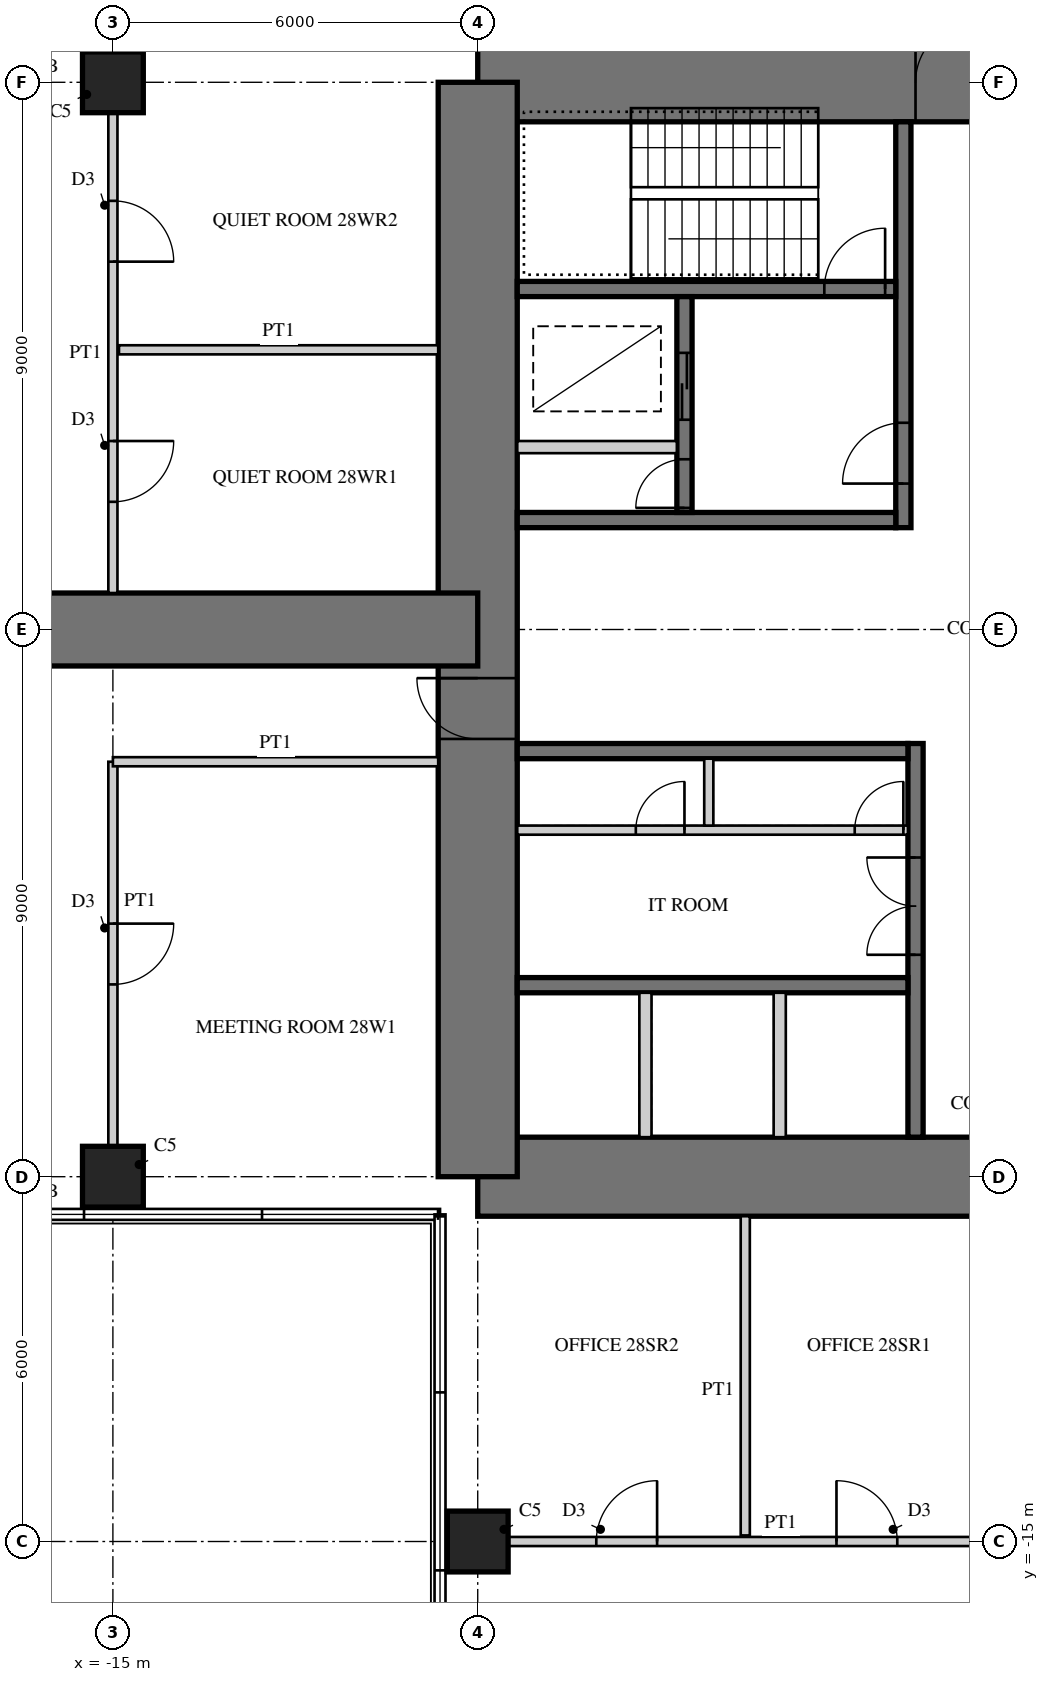
"""IFC4 building model, lengths in metres.
Left out: names, types, materials, properties, quantities, classifications, styles, units other than length and angle.
Written with IfcOpenShell. Run it as: python <this file> out.ifc"""

import sys

from ifc_helpers import new_model, si_unit, direction, frame, frame_2d, origin, origin_2d, place, context, subcontext, project, spatial, rectangle, extrude, element, fill, save


model = new_model("IFC4")
c1 = context("Model", 3, precision=1e-05, world=origin(), true_north=direction((0.0, 1.0)))
c2 = subcontext(c1, "Body", "Model", "MODEL_VIEW")
j1 = project(units=[si_unit("LENGTHUNIT", "METRE"), si_unit("PLANEANGLEUNIT", "RADIAN")], contexts=[c1])
p1 = place(None, origin())
s1 = spatial("IfcSite", under=j1, at=p1, CompositionType="ELEMENT")
p2 = place(p1, origin())
s2 = spatial("IfcBuilding", under=s1, at=p2, CompositionType="ELEMENT")
p3 = place(p2, frame((0.0, 0.0, 116.5)))
s3 = spatial("IfcBuildingStorey", under=s2, at=p3, CompositionType="ELEMENT", Elevation=116.5)
p4 = place(p3, frame((9.0, 9.0, 0.0), z_axis=(0.0, 0.0, 1.0), x_axis=(-1.0, 0.0, 0.0)))
e1 = element("IfcWall", 1, at=p4, inside=s3, PredefinedType="SHEAR", context=c2, shape_type="SweptSolid", body=[
    extrude(rectangle(XDim=18.0, YDim=1.3, at=frame_2d((9.0, 0.0))), origin(), (0.0, 0.0, 1.0), 4.0),
])
p5 = place(p4, frame((9.8, 0.0, 0.0)))
e2 = element("IfcOpeningElement", 2, at=p5, cuts=e1, PredefinedType="OPENING", context=c2, shape_type="SweptSolid", body=[
    extrude(rectangle(XDim=1.0, YDim=2.4, at=frame_2d((0.5, 1.2))), frame((0.0, 0.66, 0.0), z_axis=(0.0, -1.0, 0.0), x_axis=(1.0, 0.0, 0.0)), (0.0, 0.0, 1.0), 1.32),
])
p6 = place(p3, frame((-9.0, -9.0, 0.0), z_axis=(0.0, 0.0, 1.0), x_axis=(1.0, 0.0, 0.0)))
e3 = element("IfcWall", 3, at=p6, inside=s3, PredefinedType="SHEAR", context=c2, shape_type="SweptSolid", body=[
    extrude(rectangle(XDim=18.0, YDim=1.3, at=frame_2d((9.0, 0.0))), origin(), (0.0, 0.0, 1.0), 4.0),
])
p7 = place(p6, frame((9.8, 0.0, 0.0)))
e4 = element("IfcOpeningElement", 4, at=p7, cuts=e3, PredefinedType="OPENING", context=c2, shape_type="SweptSolid", body=[
    extrude(rectangle(XDim=1.0, YDim=2.4, at=frame_2d((0.5, 1.2))), frame((0.0, 0.66, 0.0), z_axis=(0.0, -1.0, 0.0), x_axis=(1.0, 0.0, 0.0)), (0.0, 0.0, 1.0), 1.32),
])
p8 = place(p3, frame((-9.0, 9.0, 0.0), z_axis=(0.0, 0.0, 1.0), x_axis=(0.0, -1.0, 0.0)))
e5 = element("IfcWall", 5, at=p8, inside=s3, PredefinedType="SHEAR", context=c2, shape_type="SweptSolid", body=[
    extrude(rectangle(XDim=18.0, YDim=1.3, at=frame_2d((9.0, 0.0))), origin(), (0.0, 0.0, 1.0), 4.0),
])
p9 = place(p8, frame((9.8, 0.0, 0.0)))
e6 = element("IfcOpeningElement", 6, at=p9, cuts=e5, PredefinedType="OPENING", context=c2, shape_type="SweptSolid", body=[
    extrude(rectangle(XDim=1.0, YDim=2.4, at=frame_2d((0.5, 1.2))), frame((0.0, 0.66, 0.0), z_axis=(0.0, -1.0, 0.0), x_axis=(1.0, 0.0, 0.0)), (0.0, 0.0, 1.0), 1.32),
])
p10 = place(p3, frame((-2.0, 1.675, 0.0), z_axis=(0.0, 0.0, 1.0), x_axis=(0.0, 1.0, 0.0)))
e7 = element("IfcWall", 7, at=p10, inside=s3, PredefinedType="SHEAR", context=c2, shape_type="SweptSolid", body=[
    extrude(rectangle(XDim=6.675, YDim=0.25, at=frame_2d((3.337, 0.0))), origin(), (0.0, 0.0, 1.0), 4.0),
])
p11 = place(p10, frame((0.725, 0.0, 0.0)))
e8 = element("IfcOpeningElement", 8, at=p11, cuts=e7, PredefinedType="OPENING", context=c2, shape_type="SweptSolid", body=[
    extrude(rectangle(XDim=1.0, YDim=2.1, at=frame_2d((0.5, 1.05))), frame((0.0, 0.135, 0.0), z_axis=(0.0, -1.0, 0.0), x_axis=(1.0, 0.0, 0.0)), (0.0, 0.0, 1.0), 0.27),
])
p12 = place(p3, frame((-2.125, 1.8, 0.0), z_axis=(0.0, 0.0, 1.0), x_axis=(-1.0, 0.0, 0.0)))
e9 = element("IfcWall", 9, at=p12, inside=s3, PredefinedType="SHEAR", context=c2, shape_type="SweptSolid", body=[
    extrude(rectangle(XDim=6.225, YDim=0.25, at=frame_2d((3.113, 0.0))), origin(), (0.0, 0.0, 1.0), 4.0),
])
p13 = place(p3, frame((-2.125, 5.6, 0.0), z_axis=(0.0, 0.0, 1.0), x_axis=(-1.0, 0.0, 0.0)))
e10 = element("IfcWall", 10, at=p13, inside=s3, PredefinedType="SHEAR", context=c2, shape_type="SweptSolid", body=[
    extrude(rectangle(XDim=6.225, YDim=0.25, at=frame_2d((3.113, 0.0))), origin(), (0.0, 0.0, 1.0), 4.0),
])
p14 = place(p13, frame((0.175, 0.0, 0.0)))
e11 = element("IfcOpeningElement", 11, at=p14, cuts=e10, PredefinedType="OPENING", context=c2, shape_type="SweptSolid", body=[
    extrude(rectangle(XDim=1.0, YDim=2.1, at=frame_2d((0.5, 1.05))), frame((0.0, 0.135, 0.0), z_axis=(0.0, -1.0, 0.0), x_axis=(1.0, 0.0, 0.0)), (0.0, 0.0, 1.0), 0.27),
])
p15 = place(p3, frame((-5.6, 1.925, 0.0), z_axis=(0.0, 0.0, 1.0), x_axis=(0.0, 1.0, 0.0)))
e12 = element("IfcWall", 12, at=p15, inside=s3, PredefinedType="SHEAR", context=c2, shape_type="SweptSolid", body=[
    extrude(rectangle(XDim=3.55, YDim=0.25, at=frame_2d((1.775, 0.0))), origin(), (0.0, 0.0, 1.0), 4.0),
])
p16 = place(p15, frame((1.525, 0.0, 0.0)))
e13 = element("IfcOpeningElement", 13, at=p16, cuts=e12, PredefinedType="OPENING", context=c2, shape_type="SweptSolid", body=[
    extrude(rectangle(XDim=1.1, YDim=2.2, at=frame_2d((0.55, 1.1))), frame((0.0, 0.135, 0.0), z_axis=(0.0, -1.0, 0.0), x_axis=(1.0, 0.0, 0.0)), (0.0, 0.0, 1.0), 0.27),
])
p17 = place(p15, frame((0.075, 0.0, 0.0)))
e14 = element("IfcOpeningElement", 14, at=p17, cuts=e12, PredefinedType="OPENING", context=c2, shape_type="SweptSolid", body=[
    extrude(rectangle(XDim=0.8, YDim=2.1, at=frame_2d((0.4, 1.05))), frame((0.0, 0.135, 0.0), z_axis=(0.0, -1.0, 0.0), x_axis=(1.0, 0.0, 0.0)), (0.0, 0.0, 1.0), 0.27),
])
p18 = place(p3, frame((-5.725, 3.0, 0.0), z_axis=(0.0, 0.0, 1.0), x_axis=(-1.0, 0.0, 0.0)))
e15 = element("IfcWall", 15, at=p18, inside=s3, PredefinedType="PARTITIONING", context=c2, shape_type="SweptSolid", body=[
    extrude(rectangle(XDim=2.625, YDim=0.2, at=frame_2d((1.312, 0.0))), origin(), (0.0, 0.0, 1.0), 4.0),
])
p19 = place(p3, frame((-1.8, -1.875, 0.0), z_axis=(0.0, 0.0, 1.0), x_axis=(0.0, -1.0, 0.0)))
e16 = element("IfcWall", 16, at=p19, inside=s3, PredefinedType="SHEAR", context=c2, shape_type="SweptSolid", body=[
    extrude(rectangle(XDim=6.475, YDim=0.25, at=frame_2d((3.238, 0.0))), origin(), (0.0, 0.0, 1.0), 4.0),
])
p20 = place(p19, frame((1.875, 0.0, 0.0)))
e17 = element("IfcOpeningElement", 17, at=p20, cuts=e16, PredefinedType="OPENING", context=c2, shape_type="SweptSolid", body=[
    extrude(rectangle(XDim=1.6, YDim=2.4, at=frame_2d((0.8, 1.2))), frame((0.0, 0.135, 0.0), z_axis=(0.0, -1.0, 0.0), x_axis=(1.0, 0.0, 0.0)), (0.0, 0.0, 1.0), 0.27),
])
for number, where, z_axis, x_axis in (
    (18, (-1.925, -2.0, 0.0), (0.0, 0.0, 1.0), (-1.0, 0.0, 0.0)),
    (19, (-1.925, -5.85, 0.0), (0.0, 0.0, 1.0), (-1.0, 0.0, 0.0)),
):
    element("IfcWall", number, at=place(p3, frame(where, z_axis=z_axis, x_axis=x_axis)), inside=s3, PredefinedType="SHEAR", context=c2, shape_type="SweptSolid", body=[
        extrude(rectangle(XDim=6.425, YDim=0.25, at=frame_2d((3.212, 0.0))), origin(), (0.0, 0.0, 1.0), 4.0),
    ])
p21 = place(p3, frame((-1.925, -3.3, 0.0), z_axis=(0.0, 0.0, 1.0), x_axis=(-1.0, 0.0, 0.0)))
e20 = element("IfcWall", 20, at=p21, inside=s3, PredefinedType="PARTITIONING", context=c2, shape_type="SweptSolid", body=[
    extrude(rectangle(XDim=6.425, YDim=0.15, at=frame_2d((3.212, 0.0))), origin(), (0.0, 0.0, 1.0), 4.0),
])
p22 = place(p21, frame((0.075, 0.0, 0.0)))
e21 = element("IfcOpeningElement", 21, at=p22, cuts=e20, PredefinedType="OPENING", context=c2, shape_type="SweptSolid", body=[
    extrude(rectangle(XDim=0.8, YDim=2.1, at=frame_2d((0.4, 1.05))), frame((0.0, 0.085, 0.0), z_axis=(0.0, -1.0, 0.0), x_axis=(1.0, 0.0, 0.0)), (0.0, 0.0, 1.0), 0.17),
])
p23 = place(p21, frame((3.675, 0.0, 0.0)))
e22 = element("IfcOpeningElement", 22, at=p23, cuts=e20, PredefinedType="OPENING", context=c2, shape_type="SweptSolid", body=[
    extrude(rectangle(XDim=0.8, YDim=2.1, at=frame_2d((0.4, 1.05))), frame((0.0, 0.085, 0.0), z_axis=(0.0, -1.0, 0.0), x_axis=(1.0, 0.0, 0.0)), (0.0, 0.0, 1.0), 0.17),
])
p24 = place(p3, frame((-5.2, -2.125, 0.0), z_axis=(0.0, 0.0, 1.0), x_axis=(0.0, -1.0, 0.0)))
e23 = element("IfcWall", 23, at=p24, inside=s3, PredefinedType="PARTITIONING", context=c2, shape_type="SweptSolid", body=[
    extrude(rectangle(XDim=1.1, YDim=0.15, at=frame_2d((0.55, 0.0))), origin(), (0.0, 0.0, 1.0), 4.0),
])
for number, where, z_axis, x_axis in (
    (24, (-4.033, -5.975, 0.0), (0.0, 0.0, 1.0), (0.0, -1.0, 0.0)),
    (25, (-6.242, -5.975, 0.0), (0.0, 0.0, 1.0), (0.0, -1.0, 0.0)),
):
    element("IfcWall", number, at=place(p3, frame(where, z_axis=z_axis, x_axis=x_axis)), inside=s3, PredefinedType="PARTITIONING", context=c2, shape_type="SweptSolid", body=[
        extrude(rectangle(XDim=2.375, YDim=0.2, at=frame_2d((1.188, 0.0))), origin(), (0.0, 0.0, 1.0), 4.0),
    ])
p25 = place(p3, frame((-9.0, 0.0, 0.0), z_axis=(0.0, 0.0, 1.0), x_axis=(-1.0, 0.0, 0.0)))
e26 = element("IfcWall", 26, at=p25, inside=s3, PredefinedType="SHEAR", context=c2, shape_type="SweptSolid", body=[
    extrude(rectangle(XDim=18.0, YDim=1.2, at=frame_2d((9.0, 0.0))), origin(), (0.0, 0.0, 1.0), 4.0),
])
p26 = place(p25, frame((9.8, 0.0, 0.0)))
e27 = element("IfcOpeningElement", 27, at=p26, cuts=e26, PredefinedType="OPENING", context=c2, shape_type="SweptSolid", body=[
    extrude(rectangle(XDim=1.0, YDim=2.2, at=frame_2d((0.5, 1.1))), frame((0.0, 0.61, 0.0), z_axis=(0.0, -1.0, 0.0), x_axis=(1.0, 0.0, 0.0)), (0.0, 0.0, 1.0), 1.22),
])
for number, where, z_axis, x_axis in (
    (28, (-9.0, -15.0, 0.0), (0.0, 0.0, 1.0), (1.0, 0.0, 0.0)),
    (29, (-15.0, 9.0, 0.0), (0.0, 0.0, 1.0), (1.0, 0.0, 0.0)),
    (30, (-15.0, -9.0, 0.0), (0.0, 0.0, 1.0), (1.0, 0.0, 0.0)),
):
    element("IfcColumn", number, at=place(p3, frame(where, z_axis=z_axis, x_axis=x_axis)), inside=s3, PredefinedType="COLUMN", context=c2, shape_type="SweptSolid", body=[
        extrude(rectangle(XDim=1.0, YDim=1.0, at=origin_2d()), origin(), (0.0, 0.0, 1.0), 4.0),
    ])
p27 = place(p3, frame((-8.5, -15.0, 0.0), z_axis=(0.0, 0.0, 1.0), x_axis=(1.0, 0.0, 0.0)))
e31 = element("IfcWall", 31, at=p27, inside=s3, PredefinedType="PARTITIONING", context=c2, shape_type="SweptSolid", body=[
    extrude(rectangle(XDim=7.9, YDim=0.15, at=frame_2d((3.95, 0.0))), origin(), (0.0, 0.0, 1.0), 3.0),
])
p28 = place(p27, frame((1.45, 0.0, 0.0)))
e32 = element("IfcOpeningElement", 32, at=p28, cuts=e31, PredefinedType="OPENING", context=c2, shape_type="SweptSolid", body=[
    extrude(rectangle(XDim=1.0, YDim=2.1, at=frame_2d((0.5, 1.05))), frame((0.0, 0.085, 0.0), z_axis=(0.0, -1.0, 0.0), x_axis=(1.0, 0.0, 0.0)), (0.0, 0.0, 1.0), 0.17),
])
p29 = place(p27, frame((5.4, 0.0, 0.0)))
e33 = element("IfcOpeningElement", 33, at=p29, cuts=e31, PredefinedType="OPENING", context=c2, shape_type="SweptSolid", body=[
    extrude(rectangle(XDim=1.0, YDim=2.1, at=frame_2d((0.5, 1.05))), frame((0.0, 0.085, 0.0), z_axis=(0.0, -1.0, 0.0), x_axis=(1.0, 0.0, 0.0)), (0.0, 0.0, 1.0), 0.17),
])
p30 = place(p3, frame((-4.6, -9.65, 0.0), z_axis=(0.0, 0.0, 1.0), x_axis=(0.0, -1.0, 0.0)))
e34 = element("IfcWall", 34, at=p30, inside=s3, PredefinedType="PARTITIONING", context=c2, shape_type="SweptSolid", body=[
    extrude(rectangle(XDim=5.25, YDim=0.15, at=frame_2d((2.625, 0.0))), origin(), (0.0, 0.0, 1.0), 3.8),
])
p31 = place(p3, frame((-15.0, -2.175, 0.0), z_axis=(0.0, 0.0, 1.0), x_axis=(0.0, -1.0, 0.0)))
e35 = element("IfcWall", 35, at=p31, inside=s3, PredefinedType="PARTITIONING", context=c2, shape_type="SweptSolid", body=[
    extrude(rectangle(XDim=6.325, YDim=0.15, at=frame_2d((3.163, 0.0))), origin(), (0.0, 0.0, 1.0), 3.0),
])
p32 = place(p31, frame((2.663, 0.0, 0.0)))
e36 = element("IfcOpeningElement", 36, at=p32, cuts=e35, PredefinedType="OPENING", context=c2, shape_type="SweptSolid", body=[
    extrude(rectangle(XDim=1.0, YDim=2.1, at=frame_2d((0.5, 1.05))), frame((0.0, 0.085, 0.0), z_axis=(0.0, -1.0, 0.0), x_axis=(1.0, 0.0, 0.0)), (0.0, 0.0, 1.0), 0.17),
])
p33 = place(p3, frame((-9.65, -2.175, 0.0), z_axis=(0.0, 0.0, 1.0), x_axis=(-1.0, 0.0, 0.0)))
e37 = element("IfcWall", 37, at=p33, inside=s3, PredefinedType="PARTITIONING", context=c2, shape_type="SweptSolid", body=[
    extrude(rectangle(XDim=5.35, YDim=0.15, at=frame_2d((2.675, 0.0))), origin(), (0.0, 0.0, 1.0), 3.8),
])
p34 = place(p3, frame((-15.0, 8.5, 0.0), z_axis=(0.0, 0.0, 1.0), x_axis=(0.0, -1.0, 0.0)))
e38 = element("IfcWall", 38, at=p34, inside=s3, PredefinedType="PARTITIONING", context=c2, shape_type="SweptSolid", body=[
    extrude(rectangle(XDim=7.9, YDim=0.15, at=frame_2d((3.95, 0.0))), origin(), (0.0, 0.0, 1.0), 3.0),
])
p35 = place(p34, frame((1.45, 0.0, 0.0)))
e39 = element("IfcOpeningElement", 39, at=p35, cuts=e38, PredefinedType="OPENING", context=c2, shape_type="SweptSolid", body=[
    extrude(rectangle(XDim=1.0, YDim=2.1, at=frame_2d((0.5, 1.05))), frame((0.0, 0.085, 0.0), z_axis=(0.0, -1.0, 0.0), x_axis=(1.0, 0.0, 0.0)), (0.0, 0.0, 1.0), 0.17),
])
p36 = place(p34, frame((5.4, 0.0, 0.0)))
e40 = element("IfcOpeningElement", 40, at=p36, cuts=e38, PredefinedType="OPENING", context=c2, shape_type="SweptSolid", body=[
    extrude(rectangle(XDim=1.0, YDim=2.1, at=frame_2d((0.5, 1.05))), frame((0.0, 0.085, 0.0), z_axis=(0.0, -1.0, 0.0), x_axis=(1.0, 0.0, 0.0)), (0.0, 0.0, 1.0), 0.17),
])
p37 = place(p3, frame((-9.65, 4.6, 0.0), z_axis=(0.0, 0.0, 1.0), x_axis=(-1.0, 0.0, 0.0)))
e41 = element("IfcWall", 41, at=p37, inside=s3, PredefinedType="PARTITIONING", context=c2, shape_type="SweptSolid", body=[
    extrude(rectangle(XDim=5.25, YDim=0.15, at=frame_2d((2.625, 0.0))), origin(), (0.0, 0.0, 1.0), 3.8),
])
p38 = place(p28, origin())
e42 = element("IfcDoor", 42, at=p38, inside=s3, OperationType="SINGLE_SWING_RIGHT", PredefinedType="DOOR", context=c2, shape_type="SweptSolid", body=[
    extrude(rectangle(XDim=1.0, YDim=2.1, at=frame_2d((0.5, 1.05))), frame((0.0, 0.025, 0.0), z_axis=(0.0, -1.0, 0.0), x_axis=(1.0, 0.0, 0.0)), (0.0, 0.0, 1.0), 0.05),
])
fill(e32, e42)
p39 = place(p29, origin())
e43 = element("IfcDoor", 43, at=p39, inside=s3, OperationType="SINGLE_SWING_LEFT", PredefinedType="DOOR", context=c2, shape_type="SweptSolid", body=[
    extrude(rectangle(XDim=1.0, YDim=2.1, at=frame_2d((0.5, 1.05))), frame((0.0, 0.025, 0.0), z_axis=(0.0, -1.0, 0.0), x_axis=(1.0, 0.0, 0.0)), (0.0, 0.0, 1.0), 0.05),
])
fill(e33, e43)
p40 = place(p32, origin())
e44 = element("IfcDoor", 44, at=p40, inside=s3, OperationType="SINGLE_SWING_LEFT", PredefinedType="DOOR", context=c2, shape_type="SweptSolid", body=[
    extrude(rectangle(XDim=1.0, YDim=2.1, at=frame_2d((0.5, 1.05))), frame((0.0, 0.025, 0.0), z_axis=(0.0, -1.0, 0.0), x_axis=(1.0, 0.0, 0.0)), (0.0, 0.0, 1.0), 0.05),
])
fill(e36, e44)
p41 = place(p35, origin())
e45 = element("IfcDoor", 45, at=p41, inside=s3, OperationType="SINGLE_SWING_RIGHT", PredefinedType="DOOR", context=c2, shape_type="SweptSolid", body=[
    extrude(rectangle(XDim=1.0, YDim=2.1, at=frame_2d((0.5, 1.05))), frame((0.0, 0.025, 0.0), z_axis=(0.0, -1.0, 0.0), x_axis=(1.0, 0.0, 0.0)), (0.0, 0.0, 1.0), 0.05),
])
fill(e39, e45)
p42 = place(p36, origin())
e46 = element("IfcDoor", 46, at=p42, inside=s3, OperationType="SINGLE_SWING_LEFT", PredefinedType="DOOR", context=c2, shape_type="SweptSolid", body=[
    extrude(rectangle(XDim=1.0, YDim=2.1, at=frame_2d((0.5, 1.05))), frame((0.0, 0.025, 0.0), z_axis=(0.0, -1.0, 0.0), x_axis=(1.0, 0.0, 0.0)), (0.0, 0.0, 1.0), 0.05),
])
fill(e40, e46)
p43 = place(p5, frame((1.0, 0.0, 0.0), z_axis=(0.0, 0.0, 1.0), x_axis=(-1.0, 0.0, 0.0)))
e47 = element("IfcDoor", 47, at=p43, inside=s3, OperationType="SINGLE_SWING_RIGHT", PredefinedType="DOOR", context=c2, shape_type="SweptSolid", body=[
    extrude(rectangle(XDim=1.0, YDim=2.4, at=frame_2d((0.5, 1.2))), frame((0.0, -0.005, 0.0), z_axis=(0.0, -1.0, 0.0), x_axis=(1.0, 0.0, 0.0)), (0.0, 0.0, 1.0), 0.05),
])
fill(e2, e47)
p44 = place(p9, frame((1.0, 0.0, 0.0), z_axis=(0.0, 0.0, 1.0), x_axis=(-1.0, 0.0, 0.0)))
e48 = element("IfcDoor", 48, at=p44, inside=s3, OperationType="SINGLE_SWING_RIGHT", PredefinedType="DOOR", context=c2, shape_type="SweptSolid", body=[
    extrude(rectangle(XDim=1.0, YDim=2.4, at=frame_2d((0.5, 1.2))), frame((0.0, -0.005, 0.0), z_axis=(0.0, -1.0, 0.0), x_axis=(1.0, 0.0, 0.0)), (0.0, 0.0, 1.0), 0.05),
])
fill(e6, e48)
p45 = place(p11, origin())
e49 = element("IfcDoor", 49, at=p45, inside=s3, OperationType="SINGLE_SWING_LEFT", PredefinedType="DOOR", context=c2, shape_type="SweptSolid", body=[
    extrude(rectangle(XDim=1.0, YDim=2.1, at=frame_2d((0.5, 1.05))), frame((0.0, 0.025, 0.0), z_axis=(0.0, -1.0, 0.0), x_axis=(1.0, 0.0, 0.0)), (0.0, 0.0, 1.0), 0.05),
])
fill(e8, e49)
p46 = place(p14, frame((1.0, 0.0, 0.0), z_axis=(0.0, 0.0, 1.0), x_axis=(-1.0, 0.0, 0.0)))
e50 = element("IfcDoor", 50, at=p46, inside=s3, OperationType="SINGLE_SWING_RIGHT", PredefinedType="DOOR", context=c2, shape_type="SweptSolid", body=[
    extrude(rectangle(XDim=1.0, YDim=2.1, at=frame_2d((0.5, 1.05))), frame((0.0, 0.025, 0.0), z_axis=(0.0, -1.0, 0.0), x_axis=(1.0, 0.0, 0.0)), (0.0, 0.0, 1.0), 0.05),
])
fill(e11, e50)
p47 = place(p16, origin())
e51 = element("IfcDoor", 51, at=p47, inside=s3, OperationType="DOUBLE_DOOR_SLIDING", PredefinedType="DOOR", context=c2, shape_type="SweptSolid", body=[
    extrude(rectangle(XDim=1.1, YDim=2.2, at=frame_2d((0.55, 1.1))), frame((0.0, 0.025, 0.0), z_axis=(0.0, -1.0, 0.0), x_axis=(1.0, 0.0, 0.0)), (0.0, 0.0, 1.0), 0.05),
])
fill(e13, e51)
p48 = place(p17, origin())
e52 = element("IfcDoor", 52, at=p48, inside=s3, OperationType="SINGLE_SWING_LEFT", PredefinedType="DOOR", context=c2, shape_type="SweptSolid", body=[
    extrude(rectangle(XDim=0.8, YDim=2.1, at=frame_2d((0.4, 1.05))), frame((0.0, 0.025, 0.0), z_axis=(0.0, -1.0, 0.0), x_axis=(1.0, 0.0, 0.0)), (0.0, 0.0, 1.0), 0.05),
])
fill(e14, e52)
p49 = place(p20, frame((1.6, 0.0, 0.0), z_axis=(0.0, 0.0, 1.0), x_axis=(-1.0, 0.0, 0.0)))
e53 = element("IfcDoor", 53, at=p49, inside=s3, OperationType="DOUBLE_DOOR_SINGLE_SWING", PredefinedType="DOOR", context=c2, shape_type="SweptSolid", body=[
    extrude(rectangle(XDim=1.6, YDim=2.4, at=frame_2d((0.8, 1.2))), frame((0.0, 0.025, 0.0), z_axis=(0.0, -1.0, 0.0), x_axis=(1.0, 0.0, 0.0)), (0.0, 0.0, 1.0), 0.05),
])
fill(e17, e53)
p50 = place(p22, frame((0.8, 0.0, 0.0), z_axis=(0.0, 0.0, 1.0), x_axis=(-1.0, 0.0, 0.0)))
e54 = element("IfcDoor", 54, at=p50, inside=s3, OperationType="SINGLE_SWING_RIGHT", PredefinedType="DOOR", context=c2, shape_type="SweptSolid", body=[
    extrude(rectangle(XDim=0.8, YDim=2.1, at=frame_2d((0.4, 1.05))), frame((0.0, 0.025, 0.0), z_axis=(0.0, -1.0, 0.0), x_axis=(1.0, 0.0, 0.0)), (0.0, 0.0, 1.0), 0.05),
])
fill(e21, e54)
p51 = place(p23, frame((0.8, 0.0, 0.0), z_axis=(0.0, 0.0, 1.0), x_axis=(-1.0, 0.0, 0.0)))
e55 = element("IfcDoor", 55, at=p51, inside=s3, OperationType="SINGLE_SWING_RIGHT", PredefinedType="DOOR", context=c2, shape_type="SweptSolid", body=[
    extrude(rectangle(XDim=0.8, YDim=2.1, at=frame_2d((0.4, 1.05))), frame((0.0, 0.025, 0.0), z_axis=(0.0, -1.0, 0.0), x_axis=(1.0, 0.0, 0.0)), (0.0, 0.0, 1.0), 0.05),
])
fill(e22, e55)
save(model, sys.argv[1])
